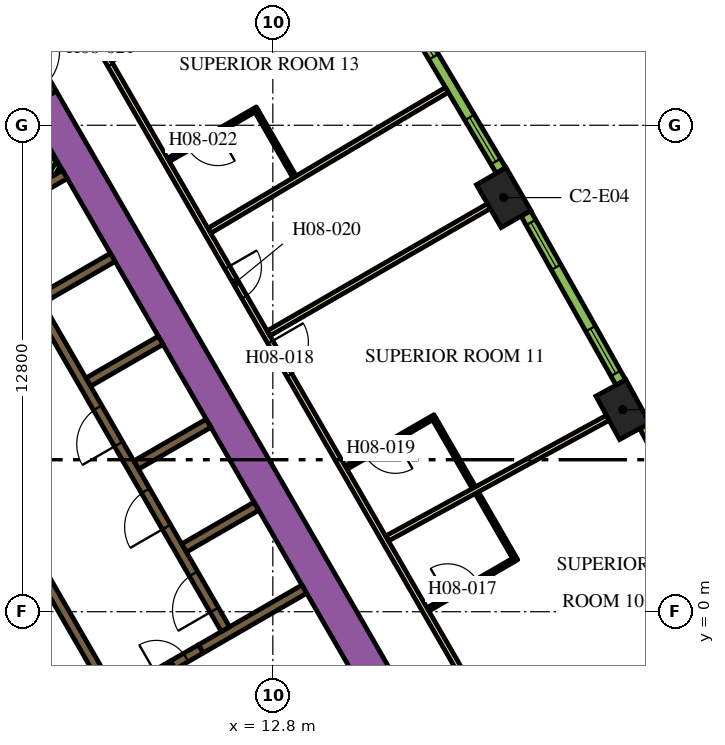
"""IFC4 building model, lengths in metres.
Left out: names, types, materials, properties, quantities, classifications, styles, units other than length and angle.
Written with IfcOpenShell. Run it as: python <this file> out.ifc"""

import sys

from ifc_helpers import new_model, si_unit, direction, frame, frame_2d, origin, origin_2d, place, context, subcontext, project, spatial, rectangle, extrude, element, fill, save


model = new_model("IFC4")
c1 = context("Model", 3, precision=1e-05, world=origin(), true_north=direction((0.0, 1.0)))
c2 = subcontext(c1, "Body", "Model", "MODEL_VIEW")
j1 = project(units=[si_unit("LENGTHUNIT", "METRE"), si_unit("PLANEANGLEUNIT", "RADIAN")], contexts=[c1])
p1 = place(None, origin())
s1 = spatial("IfcSite", under=j1, at=p1, CompositionType="ELEMENT")
p2 = place(p1, origin())
s2 = spatial("IfcBuilding", under=s1, at=p2, CompositionType="ELEMENT")
p3 = place(p2, frame((0.0, 0.0, 111.0)))
s3 = spatial("IfcBuildingStorey", under=s2, at=p3, CompositionType="ELEMENT", Elevation=111.0)
for number, where, z_axis, x_axis in (
    (1, (22.009, 5.317, 0.0), (0.0, 0.0, 1.0), (-0.48, 0.877, 0.0)),
    (2, (18.874, 10.897, 0.0), (0.0, 0.0, 1.0), (-0.5, 0.866, 0.0)),
):
    element("IfcColumn", number, at=place(p3, frame(where, z_axis=z_axis, x_axis=x_axis)), inside=s3, PredefinedType="COLUMN", context=c2, shape_type="SweptSolid", body=[
        extrude(rectangle(XDim=1.3, YDim=0.9, at=origin_2d()), origin(), (0.0, 0.0, 1.0), 3.9),
    ])
p4 = place(p3, frame((6.711, 13.476, 0.0), z_axis=(0.0, 0.0, 1.0), x_axis=(0.500002723396, -0.866023831425, 0.0)))
e3 = element("IfcWall", 3, at=p4, inside=s3, PredefinedType="SOLIDWALL", context=c2, shape_type="SweptSolid", body=[
    extrude(rectangle(XDim=20.334, YDim=0.9, at=frame_2d((10.167, 0.0))), origin(), (0.0, 0.0, 1.0), 3.9),
])
p5 = place(p3, frame((10.464, 1.677, 0.0), z_axis=(0.0, 0.0, 1.0), x_axis=(0.86605622881, 0.499946605688, 0.0)))
e4 = element("IfcWall", 4, at=p5, inside=s3, PredefinedType="SOLIDWALL", context=c2, shape_type="SweptSolid", body=[
    extrude(rectangle(XDim=2.2, YDim=0.25, at=frame_2d((1.1, 0.0))), origin(), (0.0, 0.0, 1.0), 3.9),
])
p6 = place(p3, frame((13.629, 0.594, 0.0), z_axis=(0.0, 0.0, 1.0), x_axis=(-0.86602790099, -0.499995674689, 0.0)))
e5 = element("IfcWall", 5, at=p6, inside=s3, PredefinedType="SOLIDWALL", context=c2, shape_type="SweptSolid", body=[
    extrude(rectangle(XDim=3.146, YDim=0.25, at=frame_2d((1.573, 0.0))), origin(), (0.0, 0.0, 1.0), 3.9),
])
p7 = place(p3, frame((5.356, 10.367, 0.0), z_axis=(0.0, 0.0, 1.0), x_axis=(0.865978535641, 0.50008116922, 0.0)))
e6 = element("IfcWall", 6, at=p7, inside=s3, PredefinedType="SOLIDWALL", context=c2, shape_type="SweptSolid", body=[
    extrude(rectangle(XDim=2.278, YDim=0.25, at=frame_2d((1.139, 0.0))), origin(), (0.0, 0.0, 1.0), 3.9),
])
for number, where, z_axis, x_axis in (
    (7, (6.684, 8.224, 0.0), (0.0, 0.0, 1.0), (0.866, 0.5, 0.0)),
    (8, (7.944, 6.041, 0.0), (0.0, 0.0, 1.0), (0.866, 0.5, 0.0)),
    (9, (9.204, 3.859, 0.0), (0.0, 0.0, 1.0), (0.866, 0.5, 0.0)),
):
    element("IfcWall", number, at=place(p3, frame(where, z_axis=z_axis, x_axis=x_axis)), inside=s3, PredefinedType="SOLIDWALL", context=c2, shape_type="SweptSolid", body=[
        extrude(rectangle(XDim=2.2, YDim=0.25, at=frame_2d((1.1, 0.0))), origin(), (0.0, 0.0, 1.0), 3.9),
    ])
p8 = place(p3, frame((6.482, 11.225, 0.0), z_axis=(0.0, 0.0, 1.0), x_axis=(0.5001061818, 0.865964091014, 0.0)))
e10 = element("IfcWall", 10, at=p8, inside=s3, PredefinedType="PARTITIONING", context=c2, shape_type="SweptSolid", body=[
    extrude(rectangle(XDim=0.973, YDim=0.15, at=frame_2d((0.486, 0.0))), origin(), (0.0, 0.0, 1.0), 2.75),
])
p9 = place(p3, frame((6.742, 11.375, 0.0), z_axis=(0.0, 0.0, 1.0), x_axis=(0.499744951064, 0.86617260629, 0.0)))
e11 = element("IfcWall", 11, at=p9, inside=s3, PredefinedType="PARTITIONING", context=c2, shape_type="SweptSolid", body=[
    extrude(rectangle(XDim=0.626, YDim=0.15, at=frame_2d((0.313, 0.0))), origin(), (0.0, 0.0, 1.0), 2.75),
])
p10 = place(p3, frame((7.001, 11.525, 0.0), z_axis=(0.0, 0.0, 1.0), x_axis=(0.499797962495, 0.866142018774, 0.0)))
e12 = element("IfcWall", 12, at=p10, inside=s3, PredefinedType="PARTITIONING", context=c2, shape_type="SweptSolid", body=[
    extrude(rectangle(XDim=0.28, YDim=0.15, at=frame_2d((0.14, 0.0))), origin(), (0.0, 0.0, 1.0), 2.75),
])
p11 = place(p3, frame((11.553, -0.46, 0.0), z_axis=(0.0, 0.0, 1.0), x_axis=(-0.500006514828, 0.866021642414, 0.0)))
e13 = element("IfcWall", 13, at=p11, inside=s3, PredefinedType="SOLIDWALL", context=c2, shape_type="SweptSolid", body=[
    extrude(rectangle(XDim=12.35, YDim=0.25, at=frame_2d((6.175, 0.0))), origin(), (0.0, 0.0, 1.0), 3.9),
])
p12 = place(p11, frame((0.585, 0.0, 0.0)))
e14 = element("IfcOpeningElement", 14, at=p12, cuts=e13, PredefinedType="OPENING", context=c2, shape_type="SweptSolid", body=[
    extrude(rectangle(XDim=1.1, YDim=2.1, at=frame_2d((0.55, 1.05))), frame((0.0, 0.135, 0.0), z_axis=(0.0, -1.0, 0.0), x_axis=(1.0, 0.0, 0.0)), (0.0, 0.0, 1.0), 0.27),
])
p13 = place(p11, frame((3.105, 0.0, 0.0)))
e15 = element("IfcOpeningElement", 15, at=p13, cuts=e13, PredefinedType="OPENING", context=c2, shape_type="SweptSolid", body=[
    extrude(rectangle(XDim=1.1, YDim=2.1, at=frame_2d((0.55, 1.05))), frame((0.0, 0.135, 0.0), z_axis=(0.0, -1.0, 0.0), x_axis=(1.0, 0.0, 0.0)), (0.0, 0.0, 1.0), 0.27),
])
p14 = place(p11, frame((5.625, 0.0, 0.0)))
e16 = element("IfcOpeningElement", 16, at=p14, cuts=e13, PredefinedType="OPENING", context=c2, shape_type="SweptSolid", body=[
    extrude(rectangle(XDim=1.1, YDim=2.1, at=frame_2d((0.55, 1.05))), frame((0.0, 0.135, 0.0), z_axis=(0.0, -1.0, 0.0), x_axis=(1.0, 0.0, 0.0)), (0.0, 0.0, 1.0), 0.27),
])
p15 = place(p3, frame((8.565, -2.185, 0.0), z_axis=(0.0, 0.0, 1.0), x_axis=(-0.499997954832, 0.866026584559, 0.0)))
e17 = element("IfcWall", 17, at=p15, inside=s3, PredefinedType="SOLIDWALL", context=c2, shape_type="SweptSolid", body=[
    extrude(rectangle(XDim=12.35, YDim=0.25, at=frame_2d((6.175, 0.0))), origin(), (0.0, 0.0, 1.0), 3.9),
])
p16 = place(p15, frame((5.725, 0.0, 0.0)))
e18 = element("IfcOpeningElement", 18, at=p16, cuts=e17, PredefinedType="OPENING", context=c2, shape_type="SweptSolid", body=[
    extrude(rectangle(XDim=0.9, YDim=2.1, at=frame_2d((0.45, 1.05))), frame((0.0, 0.135, 0.0), z_axis=(0.0, -1.0, 0.0), x_axis=(1.0, 0.0, 0.0)), (0.0, 0.0, 1.0), 0.27),
])
p17 = place(p3, frame((9.346, -1.879, 0.0), z_axis=(0.0, 0.0, 1.0), x_axis=(0.866047807691, 0.499961193289, 0.0)))
e19 = element("IfcWall", 19, at=p17, inside=s3, PredefinedType="SOLIDWALL", context=c2, shape_type="SweptSolid", body=[
    extrude(rectangle(XDim=1.8, YDim=0.25, at=frame_2d((0.9, 0.0))), origin(), (0.0, 0.0, 1.0), 3.9),
])
p18 = place(p17, frame((0.45, 0.0, 0.0)))
e20 = element("IfcOpeningElement", 20, at=p18, cuts=e19, PredefinedType="OPENING", context=c2, shape_type="SweptSolid", body=[
    extrude(rectangle(XDim=0.9, YDim=2.1, at=frame_2d((0.45, 1.05))), frame((0.0, 0.135, 0.0), z_axis=(0.0, -1.0, 0.0), x_axis=(1.0, 0.0, 0.0)), (0.0, 0.0, 1.0), 0.27),
])
p19 = place(p3, frame((5.861, 14.948, 0.0), z_axis=(0.0, 0.0, 1.0), x_axis=(0.500062241894, -0.865989465428, 0.0)))
e21 = element("IfcWall", 21, at=p19, inside=s3, PredefinedType="SOLIDWALL", context=c2, shape_type="SweptSolid", body=[
    extrude(rectangle(XDim=1.7, YDim=0.9, at=frame_2d((0.85, 0.0))), origin(), (0.0, 0.0, 1.0), 3.9),
])
p20 = place(p19, frame((0.25, 0.0, 0.0)))
e22 = element("IfcOpeningElement", 22, at=p20, cuts=e21, PredefinedType="OPENING", context=c2, shape_type="SweptSolid", body=[
    extrude(rectangle(XDim=1.2, YDim=2.1, at=frame_2d((0.6, 1.05))), frame((0.0, 0.46, 0.0), z_axis=(0.0, -1.0, 0.0), x_axis=(1.0, 0.0, 0.0)), (0.0, 0.0, 1.0), 0.92),
])
p21 = place(p3, frame((6.163, 18.475, 0.0), z_axis=(0.0, 0.0, 1.0), x_axis=(0.500001317485, -0.866024643133, 0.0)))
e23 = element("IfcWall", 23, at=p21, inside=s3, PredefinedType="PARTITIONING", context=c2, shape_type="SweptSolid", body=[
    extrude(rectangle(XDim=25.767, YDim=0.15, at=frame_2d((12.883, 0.0))), origin(), (0.0, 0.0, 1.0), 2.75),
])
p22 = place(p21, frame((24.241, 0.0, 0.0)))
e24 = element("IfcOpeningElement", 24, at=p22, cuts=e23, PredefinedType="OPENING", context=c2, shape_type="SweptSolid", body=[
    extrude(rectangle(XDim=1.0, YDim=2.1, at=frame_2d((0.5, 1.05))), frame((0.0, 0.085, 0.0), z_axis=(0.0, -1.0, 0.0), x_axis=(1.0, 0.0, 0.0)), (0.0, 0.0, 1.0), 0.17),
])
p23 = place(p21, frame((13.144, 0.0, 0.0)))
e25 = element("IfcOpeningElement", 25, at=p23, cuts=e23, PredefinedType="OPENING", context=c2, shape_type="SweptSolid", body=[
    extrude(rectangle(XDim=1.0, YDim=2.1, at=frame_2d((0.5, 1.05))), frame((0.0, 0.085, 0.0), z_axis=(0.0, -1.0, 0.0), x_axis=(1.0, 0.0, 0.0)), (0.0, 0.0, 1.0), 0.17),
])
p24 = place(p21, frame((10.874, 0.0, 0.0)))
e26 = element("IfcOpeningElement", 26, at=p24, cuts=e23, PredefinedType="OPENING", context=c2, shape_type="SweptSolid", body=[
    extrude(rectangle(XDim=0.9, YDim=2.1, at=frame_2d((0.45, 1.05))), frame((0.0, 0.085, 0.0), z_axis=(0.0, -1.0, 0.0), x_axis=(1.0, 0.0, 0.0)), (0.0, 0.0, 1.0), 0.17),
])
p25 = place(p21, frame((3.718, 0.0, 0.0)))
e27 = element("IfcOpeningElement", 27, at=p25, cuts=e23, PredefinedType="OPENING", context=c2, shape_type="SweptSolid", body=[
    extrude(rectangle(XDim=1.0, YDim=2.1, at=frame_2d((0.5, 1.05))), frame((0.0, 0.085, 0.0), z_axis=(0.0, -1.0, 0.0), x_axis=(1.0, 0.0, 0.0)), (0.0, 0.0, 1.0), 0.17),
])
p26 = place(p21, frame((2.411, 0.0, 0.0)))
e28 = element("IfcOpeningElement", 28, at=p26, cuts=e23, PredefinedType="OPENING", context=c2, shape_type="SweptSolid", body=[
    extrude(rectangle(XDim=1.0, YDim=2.1, at=frame_2d((0.5, 1.05))), frame((0.0, 0.085, 0.0), z_axis=(0.0, -1.0, 0.0), x_axis=(1.0, 0.0, 0.0)), (0.0, 0.0, 1.0), 0.17),
])
p27 = place(p3, frame((17.379, 13.731, 0.0), z_axis=(0.0, 0.0, 1.0), x_axis=(-0.860132461691, -0.510070728768, 0.0)))
e29 = element("IfcWall", 29, at=p27, inside=s3, PredefinedType="PARTITIONING", context=c2, shape_type="SweptSolid", body=[
    extrude(rectangle(XDim=7.257, YDim=0.15, at=frame_2d((3.628, 0.0))), origin(), (0.0, 0.0, 1.0), 2.75),
])
p28 = place(p3, frame((18.484, 10.672, 0.0), z_axis=(0.0, 0.0, 1.0), x_axis=(-0.866019162053, -0.50001081084, 0.0)))
e30 = element("IfcWall", 30, at=p28, inside=s3, PredefinedType="PARTITIONING", context=c2, shape_type="SweptSolid", body=[
    extrude(rectangle(XDim=6.694, YDim=0.15, at=frame_2d((3.347, 0.0))), origin(), (0.0, 0.0, 1.0), 2.75),
])
p29 = place(p3, frame((21.614, 5.102, 0.0), z_axis=(0.0, 0.0, 1.0), x_axis=(-0.877484555087, -0.479604895287, 0.0)))
e31 = element("IfcWall", 31, at=p29, inside=s3, PredefinedType="PARTITIONING", context=c2, shape_type="SweptSolid", body=[
    extrude(rectangle(XDim=6.611, YDim=0.15, at=frame_2d((3.306, 0.0))), origin(), (0.0, 0.0, 1.0), 2.75),
])
p30 = place(p3, frame((24.613, -0.541, 0.0), z_axis=(0.0, 0.0, 1.0), x_axis=(-0.888459912519, -0.458954228487, 0.0)))
e32 = element("IfcWall", 32, at=p30, inside=s3, PredefinedType="PARTITIONING", context=c2, shape_type="SweptSolid", body=[
    extrude(rectangle(XDim=6.392, YDim=0.15, at=frame_2d((3.196, 0.0))), origin(), (0.0, 0.0, 1.0), 2.75),
])
p31 = place(p3, frame((16.881, 0.061, 0.0), z_axis=(0.0, 0.0, 1.0), x_axis=(0.866019956843, 0.50000943426, 0.0)))
e33 = element("IfcWall", 33, at=p31, inside=s3, PredefinedType="PARTITIONING", context=c2, shape_type="SweptSolid", body=[
    extrude(rectangle(XDim=2.7, YDim=0.1, at=frame_2d((1.35, 0.0))), origin(), (0.0, 0.0, 1.0), 2.75),
])
p32 = place(p31, frame((0.6, 0.0, 0.0)))
e34 = element("IfcOpeningElement", 34, at=p32, cuts=e33, PredefinedType="OPENING", context=c2, shape_type="SweptSolid", body=[
    extrude(rectangle(XDim=0.9, YDim=2.1, at=frame_2d((0.45, 1.05))), frame((0.0, 0.06, 0.0), z_axis=(0.0, -1.0, 0.0), x_axis=(1.0, 0.0, 0.0)), (0.0, 0.0, 1.0), 0.12),
])
p33 = place(p3, frame((19.151, 1.429, 0.0), z_axis=(0.0, 0.0, 1.0), x_axis=(-0.500024377727, 0.866011328839, 0.0)))
e35 = element("IfcWall", 35, at=p33, inside=s3, PredefinedType="PARTITIONING", context=c2, shape_type="SweptSolid", body=[
    extrude(rectangle(XDim=1.96, YDim=0.1, at=frame_2d((0.98, 0.0))), origin(), (0.0, 0.0, 1.0), 2.75),
])
p34 = place(p3, frame((17.066, 5.141, 0.0), z_axis=(0.0, 0.0, 1.0), x_axis=(-0.866059108428, -0.4999416173, 0.0)))
e36 = element("IfcWall", 36, at=p34, inside=s3, PredefinedType="PARTITIONING", context=c2, shape_type="SweptSolid", body=[
    extrude(rectangle(XDim=2.7, YDim=0.1, at=frame_2d((1.35, 0.0))), origin(), (0.0, 0.0, 1.0), 2.75),
])
p35 = place(p34, frame((1.2, 0.0, 0.0)))
e37 = element("IfcOpeningElement", 37, at=p35, cuts=e36, PredefinedType="OPENING", context=c2, shape_type="SweptSolid", body=[
    extrude(rectangle(XDim=0.9, YDim=2.1, at=frame_2d((0.45, 1.05))), frame((0.0, 0.06, 0.0), z_axis=(0.0, -1.0, 0.0), x_axis=(1.0, 0.0, 0.0)), (0.0, 0.0, 1.0), 0.12),
])
p36 = place(p3, frame((17.047, 5.073, 0.0), z_axis=(0.0, 0.0, 1.0), x_axis=(0.500008976872, -0.866020220923, 0.0)))
e38 = element("IfcWall", 38, at=p36, inside=s3, PredefinedType="PARTITIONING", context=c2, shape_type="SweptSolid", body=[
    extrude(rectangle(XDim=2.09, YDim=0.1, at=frame_2d((1.045, 0.0))), origin(), (0.0, 0.0, 1.0), 2.75),
])
p37 = place(p3, frame((12.39, 13.239, 0.0), z_axis=(0.0, 0.0, 1.0), x_axis=(-0.866036505625, -0.499980770555, 0.0)))
e39 = element("IfcWall", 39, at=p37, inside=s3, PredefinedType="PARTITIONING", context=c2, shape_type="SweptSolid", body=[
    extrude(rectangle(XDim=2.7, YDim=0.1, at=frame_2d((1.35, 0.0))), origin(), (0.0, 0.0, 1.0), 2.75),
])
p38 = place(p37, frame((1.2, 0.0, 0.0)))
e40 = element("IfcOpeningElement", 40, at=p38, cuts=e39, PredefinedType="OPENING", context=c2, shape_type="SweptSolid", body=[
    extrude(rectangle(XDim=0.9, YDim=2.1, at=frame_2d((0.45, 1.05))), frame((0.0, 0.06, 0.0), z_axis=(0.0, -1.0, 0.0), x_axis=(1.0, 0.0, 0.0)), (0.0, 0.0, 1.0), 0.12),
])
p39 = place(p3, frame((12.372, 13.171, 0.0), z_axis=(0.0, 0.0, 1.0), x_axis=(0.500044573643, -0.86599966765, 0.0)))
e41 = element("IfcWall", 41, at=p39, inside=s3, PredefinedType="PARTITIONING", context=c2, shape_type="SweptSolid", body=[
    extrude(rectangle(XDim=1.99, YDim=0.1, at=frame_2d((0.995, 0.0))), origin(), (0.0, 0.0, 1.0), 2.75),
])
p40 = place(p3, frame((24.977, 0.383, 0.0), z_axis=(0.0, 0.0, 1.0), x_axis=(-0.469323203119, 0.883026461106, 0.0)))
e42 = element("IfcWall", 42, at=p40, inside=s3, PredefinedType="SOLIDWALL", context=c2, shape_type="SweptSolid", body=[
    extrude(rectangle(XDim=5.101, YDim=0.29, at=frame_2d((2.55, 0.0))), origin(), (0.0, 0.0, 1.0), 3.65),
])
p41 = place(p40, frame((0.273, 0.0, 0.9)))
e43 = element("IfcOpeningElement", 43, at=p41, cuts=e42, PredefinedType="OPENING", context=c2, shape_type="SweptSolid", body=[
    extrude(rectangle(XDim=1.35, YDim=2.15, at=frame_2d((0.675, 1.075))), frame((0.0, 0.155, 0.0), z_axis=(0.0, -1.0, 0.0), x_axis=(1.0, 0.0, 0.0)), (0.0, 0.0, 1.0), 0.31),
])
p42 = place(p40, frame((3.478, 0.0, 0.9)))
e44 = element("IfcOpeningElement", 44, at=p42, cuts=e42, PredefinedType="OPENING", context=c2, shape_type="SweptSolid", body=[
    extrude(rectangle(XDim=1.35, YDim=2.15, at=frame_2d((0.675, 1.075))), frame((0.0, 0.155, 0.0), z_axis=(0.0, -1.0, 0.0), x_axis=(1.0, 0.0, 0.0)), (0.0, 0.0, 1.0), 0.31),
])
p43 = place(p3, frame((21.956, 6.033, 0.0), z_axis=(0.0, 0.0, 1.0), x_axis=(-0.48983164787, 0.87181704316, 0.0)))
e45 = element("IfcWall", 45, at=p43, inside=s3, PredefinedType="SOLIDWALL", context=c2, shape_type="SweptSolid", body=[
    extrude(rectangle(XDim=5.1, YDim=0.29, at=frame_2d((2.55, 0.0))), origin(), (0.0, 0.0, 1.0), 3.65),
])
p44 = place(p43, frame((0.273, 0.0, 0.9)))
e46 = element("IfcOpeningElement", 46, at=p44, cuts=e45, PredefinedType="OPENING", context=c2, shape_type="SweptSolid", body=[
    extrude(rectangle(XDim=1.35, YDim=2.15, at=frame_2d((0.675, 1.075))), frame((0.0, 0.155, 0.0), z_axis=(0.0, -1.0, 0.0), x_axis=(1.0, 0.0, 0.0)), (0.0, 0.0, 1.0), 0.31),
])
p45 = place(p43, frame((3.478, 0.0, 0.9)))
e47 = element("IfcOpeningElement", 47, at=p45, cuts=e45, PredefinedType="OPENING", context=c2, shape_type="SweptSolid", body=[
    extrude(rectangle(XDim=1.35, YDim=2.15, at=frame_2d((0.675, 1.075))), frame((0.0, 0.155, 0.0), z_axis=(0.0, -1.0, 0.0), x_axis=(1.0, 0.0, 0.0)), (0.0, 0.0, 1.0), 0.31),
])
p46 = place(p3, frame((18.805, 11.611, 0.0), z_axis=(0.0, 0.0, 1.0), x_axis=(-0.510054281659, 0.860142214847, 0.0)))
e48 = element("IfcWall", 48, at=p46, inside=s3, PredefinedType="SOLIDWALL", context=c2, shape_type="SweptSolid", body=[
    extrude(rectangle(XDim=5.101, YDim=0.29, at=frame_2d((2.55, 0.0))), origin(), (0.0, 0.0, 1.0), 3.65),
])
p47 = place(p46, frame((0.273, 0.0, 0.9)))
e49 = element("IfcOpeningElement", 49, at=p47, cuts=e48, PredefinedType="OPENING", context=c2, shape_type="SweptSolid", body=[
    extrude(rectangle(XDim=1.35, YDim=2.15, at=frame_2d((0.675, 1.075))), frame((0.0, 0.155, 0.0), z_axis=(0.0, -1.0, 0.0), x_axis=(1.0, 0.0, 0.0)), (0.0, 0.0, 1.0), 0.31),
])
p48 = place(p46, frame((3.478, 0.0, 0.9)))
e50 = element("IfcOpeningElement", 50, at=p48, cuts=e48, PredefinedType="OPENING", context=c2, shape_type="SweptSolid", body=[
    extrude(rectangle(XDim=1.35, YDim=2.15, at=frame_2d((0.675, 1.075))), frame((0.0, 0.155, 0.0), z_axis=(0.0, -1.0, 0.0), x_axis=(1.0, 0.0, 0.0)), (0.0, 0.0, 1.0), 0.31),
])
p49 = place(p12, origin())
e51 = element("IfcDoor", 51, at=p49, inside=s3, OperationType="DOUBLE_DOOR_SLIDING", PredefinedType="DOOR", context=c2, shape_type="SweptSolid", body=[
    extrude(rectangle(XDim=1.1, YDim=2.1, at=frame_2d((0.55, 1.05))), frame((0.0, 0.025, 0.0), z_axis=(0.0, -1.0, 0.0), x_axis=(1.0, 0.0, 0.0)), (0.0, 0.0, 1.0), 0.05),
])
fill(e14, e51)
p50 = place(p13, origin())
e52 = element("IfcDoor", 52, at=p50, inside=s3, OperationType="DOUBLE_DOOR_SLIDING", PredefinedType="DOOR", context=c2, shape_type="SweptSolid", body=[
    extrude(rectangle(XDim=1.1, YDim=2.1, at=frame_2d((0.55, 1.05))), frame((0.0, 0.025, 0.0), z_axis=(0.0, -1.0, 0.0), x_axis=(1.0, 0.0, 0.0)), (0.0, 0.0, 1.0), 0.05),
])
fill(e15, e52)
p51 = place(p14, origin())
e53 = element("IfcDoor", 53, at=p51, inside=s3, OperationType="DOUBLE_DOOR_SLIDING", PredefinedType="DOOR", context=c2, shape_type="SweptSolid", body=[
    extrude(rectangle(XDim=1.1, YDim=2.1, at=frame_2d((0.55, 1.05))), frame((0.0, 0.025, 0.0), z_axis=(0.0, -1.0, 0.0), x_axis=(1.0, 0.0, 0.0)), (0.0, 0.0, 1.0), 0.05),
])
fill(e16, e53)
p52 = place(p18, origin())
e54 = element("IfcDoor", 54, at=p52, inside=s3, OperationType="SINGLE_SWING_LEFT", PredefinedType="DOOR", context=c2, shape_type="SweptSolid", body=[
    extrude(rectangle(XDim=0.9, YDim=2.1, at=frame_2d((0.45, 1.05))), frame((0.0, 0.025, 0.0), z_axis=(0.0, -1.0, 0.0), x_axis=(1.0, 0.0, 0.0)), (0.0, 0.0, 1.0), 0.05),
])
fill(e20, e54)
p53 = place(p32, origin())
e55 = element("IfcDoor", 55, at=p53, inside=s3, OperationType="SINGLE_SWING_LEFT", PredefinedType="DOOR", context=c2, shape_type="SweptSolid", body=[
    extrude(rectangle(XDim=0.9, YDim=2.1, at=frame_2d((0.45, 1.05))), frame((0.0, 0.025, 0.0), z_axis=(0.0, -1.0, 0.0), x_axis=(1.0, 0.0, 0.0)), (0.0, 0.0, 1.0), 0.05),
])
fill(e34, e55)
p54 = place(p23, origin())
e56 = element("IfcDoor", 56, at=p54, inside=s3, OperationType="SINGLE_SWING_LEFT", PredefinedType="DOOR", context=c2, shape_type="SweptSolid", body=[
    extrude(rectangle(XDim=1.0, YDim=2.1, at=frame_2d((0.5, 1.05))), frame((0.0, 0.025, 0.0), z_axis=(0.0, -1.0, 0.0), x_axis=(1.0, 0.0, 0.0)), (0.0, 0.0, 1.0), 0.05),
])
fill(e25, e56)
p55 = place(p35, origin())
e57 = element("IfcDoor", 57, at=p55, inside=s3, OperationType="SINGLE_SWING_LEFT", PredefinedType="DOOR", context=c2, shape_type="SweptSolid", body=[
    extrude(rectangle(XDim=0.9, YDim=2.1, at=frame_2d((0.45, 1.05))), frame((0.0, 0.025, 0.0), z_axis=(0.0, -1.0, 0.0), x_axis=(1.0, 0.0, 0.0)), (0.0, 0.0, 1.0), 0.05),
])
fill(e37, e57)
p56 = place(p24, origin())
e58 = element("IfcDoor", 58, at=p56, inside=s3, OperationType="SINGLE_SWING_RIGHT", PredefinedType="DOOR", context=c2, shape_type="SweptSolid", body=[
    extrude(rectangle(XDim=0.9, YDim=2.1, at=frame_2d((0.45, 1.05))), frame((0.0, 0.025, 0.0), z_axis=(0.0, -1.0, 0.0), x_axis=(1.0, 0.0, 0.0)), (0.0, 0.0, 1.0), 0.05),
])
fill(e26, e58)
p57 = place(p25, origin())
e59 = element("IfcDoor", 59, at=p57, inside=s3, OperationType="SINGLE_SWING_LEFT", PredefinedType="DOOR", context=c2, shape_type="SweptSolid", body=[
    extrude(rectangle(XDim=1.0, YDim=2.1, at=frame_2d((0.5, 1.05))), frame((0.0, 0.025, 0.0), z_axis=(0.0, -1.0, 0.0), x_axis=(1.0, 0.0, 0.0)), (0.0, 0.0, 1.0), 0.05),
])
fill(e27, e59)
p58 = place(p38, origin())
e60 = element("IfcDoor", 60, at=p58, inside=s3, OperationType="SINGLE_SWING_LEFT", PredefinedType="DOOR", context=c2, shape_type="SweptSolid", body=[
    extrude(rectangle(XDim=0.9, YDim=2.1, at=frame_2d((0.45, 1.05))), frame((0.0, 0.025, 0.0), z_axis=(0.0, -1.0, 0.0), x_axis=(1.0, 0.0, 0.0)), (0.0, 0.0, 1.0), 0.05),
])
fill(e40, e60)
p59 = place(p44, origin())
e61 = element("IfcWindow", 61, at=p59, inside=s3, PartitioningType="DOUBLE_PANEL_VERTICAL", PredefinedType="WINDOW", context=c2, shape_type="SweptSolid", body=[
    extrude(rectangle(XDim=1.35, YDim=2.15, at=frame_2d((0.675, 1.075))), frame((0.0, 0.015, 0.0), z_axis=(0.0, -1.0, 0.0), x_axis=(1.0, 0.0, 0.0)), (0.0, 0.0, 1.0), 0.06),
])
fill(e46, e61)
p60 = place(p45, origin())
e62 = element("IfcWindow", 62, at=p60, inside=s3, PartitioningType="DOUBLE_PANEL_VERTICAL", PredefinedType="WINDOW", context=c2, shape_type="SweptSolid", body=[
    extrude(rectangle(XDim=1.35, YDim=2.15, at=frame_2d((0.675, 1.075))), frame((0.0, 0.015, 0.0), z_axis=(0.0, -1.0, 0.0), x_axis=(1.0, 0.0, 0.0)), (0.0, 0.0, 1.0), 0.06),
])
fill(e47, e62)
p61 = place(p47, origin())
e63 = element("IfcWindow", 63, at=p61, inside=s3, PartitioningType="DOUBLE_PANEL_VERTICAL", PredefinedType="WINDOW", context=c2, shape_type="SweptSolid", body=[
    extrude(rectangle(XDim=1.35, YDim=2.15, at=frame_2d((0.675, 1.075))), frame((0.0, 0.015, 0.0), z_axis=(0.0, -1.0, 0.0), x_axis=(1.0, 0.0, 0.0)), (0.0, 0.0, 1.0), 0.06),
])
fill(e49, e63)
p62 = place(p48, origin())
e64 = element("IfcWindow", 64, at=p62, inside=s3, PartitioningType="DOUBLE_PANEL_VERTICAL", PredefinedType="WINDOW", context=c2, shape_type="SweptSolid", body=[
    extrude(rectangle(XDim=1.35, YDim=2.15, at=frame_2d((0.675, 1.075))), frame((0.0, 0.015, 0.0), z_axis=(0.0, -1.0, 0.0), x_axis=(1.0, 0.0, 0.0)), (0.0, 0.0, 1.0), 0.06),
])
fill(e50, e64)
save(model, sys.argv[1])
